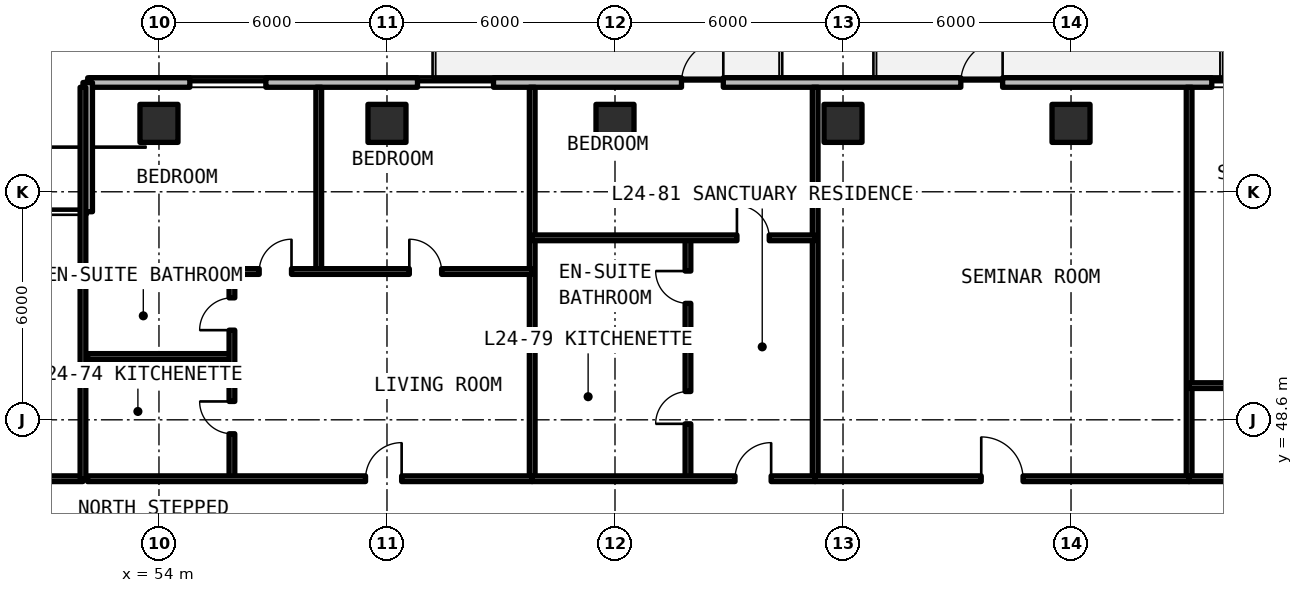
"""IFC4 building model, lengths in metres.
Left out: names, types, materials, properties, quantities, classifications, styles, units other than length and angle.
Written with IfcOpenShell. Run it as: python <this file> out.ifc"""

import sys

from ifc_helpers import new_model, si_unit, direction, frame, frame_2d, origin, origin_2d, place, context, subcontext, project, spatial, rectangle, extrude, element, fill, save


model = new_model("IFC4")
c1 = context("Model", 3, precision=1e-05, world=origin(), true_north=direction((0.0, 1.0)))
c2 = subcontext(c1, "Body", "Model", "MODEL_VIEW")
j1 = project(units=[si_unit("LENGTHUNIT", "METRE"), si_unit("PLANEANGLEUNIT", "RADIAN")], contexts=[c1])
p1 = place(None, origin())
s1 = spatial("IfcSite", under=j1, at=p1, CompositionType="ELEMENT")
p2 = place(p1, origin())
s2 = spatial("IfcBuilding", under=s1, at=p2, CompositionType="ELEMENT")
p3 = place(p2, frame((0.0, 0.0, 88.77)))
s3 = spatial("IfcBuildingStorey", under=s2, at=p3, CompositionType="ELEMENT", Elevation=88.77)
for number, where, z_axis, x_axis in (
    (1, (54.0, 56.4, 0.0), (0.0, 0.0, 1.0), (1.0, 0.0, 0.0)),
    (2, (60.0, 56.4, 0.0), (0.0, 0.0, 1.0), (1.0, 0.0, 0.0)),
    (3, (66.0, 56.4, 0.0), (0.0, 0.0, 1.0), (1.0, 0.0, 0.0)),
    (4, (72.0, 56.4, 0.0), (0.0, 0.0, 1.0), (1.0, 0.0, 0.0)),
    (5, (78.0, 56.4, 0.0), (0.0, 0.0, 1.0), (1.0, 0.0, 0.0)),
):
    element("IfcColumn", number, at=place(p3, frame(where, z_axis=z_axis, x_axis=x_axis)), inside=s3, PredefinedType="COLUMN", context=c2, shape_type="SweptSolid", body=[
        extrude(rectangle(XDim=1.0, YDim=1.0, at=origin_2d()), origin(), (0.0, 0.0, 1.0), 3.3),
    ])
p4 = place(p3, frame((96.148, 57.475, 0.0), z_axis=(0.0, 0.0, 1.0), x_axis=(-1.0, 0.0, 0.0)))
e6 = element("IfcWall", 6, at=p4, inside=s3, PredefinedType="SOLIDWALL", context=c2, shape_type="SweptSolid", body=[
    extrude(rectangle(XDim=44.023, YDim=0.25, at=frame_2d((22.012, 0.0))), origin(), (0.0, 0.0, 1.0), 3.08),
])
p5 = place(p4, frame((27.298, 0.0, 0.0)))
e7 = element("IfcOpeningElement", 7, at=p5, cuts=e6, PredefinedType="OPENING", context=c2, shape_type="SweptSolid", body=[
    extrude(rectangle(XDim=1.1, YDim=2.15, at=frame_2d((0.55, 1.075))), frame((0.0, 0.135, 0.0), z_axis=(0.0, -1.0, 0.0), x_axis=(1.0, 0.0, 0.0)), (0.0, 0.0, 1.0), 0.27),
])
p6 = place(p4, frame((19.948, 0.0, 0.0)))
e8 = element("IfcOpeningElement", 8, at=p6, cuts=e6, PredefinedType="OPENING", context=c2, shape_type="SweptSolid", body=[
    extrude(rectangle(XDim=1.1, YDim=2.15, at=frame_2d((0.55, 1.075))), frame((0.0, 0.135, 0.0), z_axis=(0.0, -1.0, 0.0), x_axis=(1.0, 0.0, 0.0)), (0.0, 0.0, 1.0), 0.27),
])
p7 = place(p4, frame((8.098, 0.0, 0.0)))
e9 = element("IfcOpeningElement", 9, at=p7, cuts=e6, PredefinedType="OPENING", context=c2, shape_type="SweptSolid", body=[
    extrude(rectangle(XDim=1.1, YDim=2.15, at=frame_2d((0.55, 1.075))), frame((0.0, 0.135, 0.0), z_axis=(0.0, -1.0, 0.0), x_axis=(1.0, 0.0, 0.0)), (0.0, 0.0, 1.0), 0.27),
])
p8 = place(p4, frame((39.336, 0.0, 0.78)))
e10 = element("IfcOpeningElement", 10, at=p8, cuts=e6, PredefinedType="OPENING", context=c2, shape_type="SweptSolid", body=[
    extrude(rectangle(XDim=2.0, YDim=1.66, at=frame_2d((1.0, 0.83))), frame((0.0, 0.135, 0.0), z_axis=(0.0, -1.0, 0.0), x_axis=(1.0, 0.0, 0.0)), (0.0, 0.0, 1.0), 0.27),
])
p9 = place(p4, frame((33.345, 0.0, 0.78)))
e11 = element("IfcOpeningElement", 11, at=p9, cuts=e6, PredefinedType="OPENING", context=c2, shape_type="SweptSolid", body=[
    extrude(rectangle(XDim=2.0, YDim=1.66, at=frame_2d((1.0, 0.83))), frame((0.0, 0.135, 0.0), z_axis=(0.0, -1.0, 0.0), x_axis=(1.0, 0.0, 0.0)), (0.0, 0.0, 1.0), 0.27),
])
p10 = place(p4, frame((13.044, 0.0, 0.78)))
e12 = element("IfcOpeningElement", 12, at=p10, cuts=e6, PredefinedType="OPENING", context=c2, shape_type="SweptSolid", body=[
    extrude(rectangle(XDim=1.4, YDim=1.65, at=frame_2d((0.7, 0.825))), frame((0.0, 0.135, 0.0), z_axis=(0.0, -1.0, 0.0), x_axis=(1.0, 0.0, 0.0)), (0.0, 0.0, 1.0), 0.27),
])
p11 = place(p4, frame((2.871, 0.0, 0.78)))
e13 = element("IfcOpeningElement", 13, at=p11, cuts=e6, PredefinedType="OPENING", context=c2, shape_type="SweptSolid", body=[
    extrude(rectangle(XDim=2.0, YDim=1.66, at=frame_2d((1.0, 0.83))), frame((0.0, 0.135, 0.0), z_axis=(0.0, -1.0, 0.0), x_axis=(1.0, 0.0, 0.0)), (0.0, 0.0, 1.0), 0.27),
])
p12 = place(p3, frame((52.125, 57.475, 0.0), z_axis=(0.0, 0.0, 1.0), x_axis=(0.0, -1.0, 0.0)))
e14 = element("IfcWall", 14, at=p12, inside=s3, PredefinedType="SOLIDWALL", context=c2, shape_type="SweptSolid", body=[
    extrude(rectangle(XDim=3.4, YDim=0.25, at=frame_2d((1.7, 0.0))), origin(), (0.0, 0.0, 1.0), 3.08),
])
p13 = place(p3, frame((43.6, 47.05, 0.0), z_axis=(0.0, 0.0, 1.0), x_axis=(1.0, 0.0, 0.0)))
e15 = element("IfcWall", 15, at=p13, inside=s3, PredefinedType="SOLIDWALL", context=c2, shape_type="SweptSolid", body=[
    extrude(rectangle(XDim=8.4, YDim=0.15, at=frame_2d((4.2, 0.0))), origin(), (0.0, 0.0, 1.0), 2.35),
])
p14 = place(p13, frame((3.65, 0.0, 0.0)))
e16 = element("IfcOpeningElement", 16, at=p14, cuts=e15, PredefinedType="OPENING", context=c2, shape_type="SweptSolid", body=[
    extrude(rectangle(XDim=1.1, YDim=2.15, at=frame_2d((0.55, 1.075))), frame((0.0, 0.085, 0.0), z_axis=(0.0, -1.0, 0.0), x_axis=(1.0, 0.0, 0.0)), (0.0, 0.0, 1.0), 0.17),
])
for number, where, z_axis, x_axis in (
    (17, (52.0, 47.05, 0.0), (0.0, 0.0, 1.0), (0.0, 1.0, 0.0)),
    (18, (63.821, 47.05, 0.0), (0.0, 0.0, 1.0), (0.0, 1.0, 0.0)),
):
    element("IfcWall", number, at=place(p3, frame(where, z_axis=z_axis, x_axis=x_axis)), inside=s3, PredefinedType="SOLIDWALL", context=c2, shape_type="SweptSolid", body=[
        extrude(rectangle(XDim=10.3, YDim=0.15, at=frame_2d((5.15, 0.0))), origin(), (0.0, 0.0, 1.0), 2.35),
    ])
p15 = place(p3, frame((52.12, 50.267, 0.0), z_axis=(0.0, 0.0, 1.0), x_axis=(1.0, 0.0, 0.0)))
e19 = element("IfcWall", 19, at=p15, inside=s3, PredefinedType="PARTITIONING", context=c2, shape_type="SweptSolid", body=[
    extrude(rectangle(XDim=3.8, YDim=0.15, at=frame_2d((1.9, 0.0))), origin(), (0.0, 0.0, 1.0), 2.35),
])
p16 = place(p3, frame((55.92, 47.05, 0.0), z_axis=(0.0, 0.0, 1.0), x_axis=(0.0, 1.0, 0.0)))
e20 = element("IfcWall", 20, at=p16, inside=s3, PredefinedType="PARTITIONING", context=c2, shape_type="SweptSolid", body=[
    extrude(rectangle(XDim=5.452, YDim=0.15, at=frame_2d((2.726, 0.0))), origin(), (0.0, 0.0, 1.0), 2.35),
])
p17 = place(p16, frame((1.183, 0.0, 0.0)))
e21 = element("IfcOpeningElement", 21, at=p17, cuts=e20, PredefinedType="OPENING", context=c2, shape_type="SweptSolid", body=[
    extrude(rectangle(XDim=0.85, YDim=2.1, at=frame_2d((0.425, 1.05))), frame((0.0, 0.085, 0.0), z_axis=(0.0, -1.0, 0.0), x_axis=(1.0, 0.0, 0.0)), (0.0, 0.0, 1.0), 0.17),
])
p18 = place(p16, frame((3.909, 0.0, 0.0)))
e22 = element("IfcOpeningElement", 22, at=p18, cuts=e20, PredefinedType="OPENING", context=c2, shape_type="SweptSolid", body=[
    extrude(rectangle(XDim=0.85, YDim=2.1, at=frame_2d((0.425, 1.05))), frame((0.0, 0.085, 0.0), z_axis=(0.0, -1.0, 0.0), x_axis=(1.0, 0.0, 0.0)), (0.0, 0.0, 1.0), 0.17),
])
p19 = place(p3, frame((58.205, 52.502, 0.0), z_axis=(0.0, 0.0, 1.0), x_axis=(0.0, 1.0, 0.0)))
e23 = element("IfcWall", 23, at=p19, inside=s3, PredefinedType="PARTITIONING", context=c2, shape_type="SweptSolid", body=[
    extrude(rectangle(XDim=4.848, YDim=0.15, at=frame_2d((2.424, 0.0))), origin(), (0.0, 0.0, 1.0), 2.35),
])
p20 = place(p3, frame((52.12, 52.502, 0.0), z_axis=(0.0, 0.0, 1.0), x_axis=(1.0, 0.0, 0.0)))
e24 = element("IfcWall", 24, at=p20, inside=s3, PredefinedType="PARTITIONING", context=c2, shape_type="SweptSolid", body=[
    extrude(rectangle(XDim=11.701, YDim=0.15, at=frame_2d((5.851, 0.0))), origin(), (0.0, 0.0, 1.0), 2.35),
])
p21 = place(p20, frame((4.517, 0.0, 0.0)))
e25 = element("IfcOpeningElement", 25, at=p21, cuts=e24, PredefinedType="OPENING", context=c2, shape_type="SweptSolid", body=[
    extrude(rectangle(XDim=0.85, YDim=2.1, at=frame_2d((0.425, 1.05))), frame((0.0, 0.085, 0.0), z_axis=(0.0, -1.0, 0.0), x_axis=(1.0, 0.0, 0.0)), (0.0, 0.0, 1.0), 0.17),
])
p22 = place(p20, frame((8.468, 0.0, 0.0)))
e26 = element("IfcOpeningElement", 26, at=p22, cuts=e24, PredefinedType="OPENING", context=c2, shape_type="SweptSolid", body=[
    extrude(rectangle(XDim=0.85, YDim=2.1, at=frame_2d((0.425, 1.05))), frame((0.0, 0.085, 0.0), z_axis=(0.0, -1.0, 0.0), x_axis=(1.0, 0.0, 0.0)), (0.0, 0.0, 1.0), 0.17),
])
p23 = place(p3, frame((52.12, 47.05, 0.0), z_axis=(0.0, 0.0, 1.0), x_axis=(1.0, 0.0, 0.0)))
e27 = element("IfcWall", 27, at=p23, inside=s3, PredefinedType="SOLIDWALL", context=c2, shape_type="SweptSolid", body=[
    extrude(rectangle(XDim=11.701, YDim=0.15, at=frame_2d((5.851, 0.0))), origin(), (0.0, 0.0, 1.0), 2.35),
])
p24 = place(p23, frame((7.316, 0.0, 0.0)))
e28 = element("IfcOpeningElement", 28, at=p24, cuts=e27, PredefinedType="OPENING", context=c2, shape_type="SweptSolid", body=[
    extrude(rectangle(XDim=0.95, YDim=2.15, at=frame_2d((0.475, 1.075))), frame((0.0, 0.085, 0.0), z_axis=(0.0, -1.0, 0.0), x_axis=(1.0, 0.0, 0.0)), (0.0, 0.0, 1.0), 0.17),
])
p25 = place(p3, frame((71.268, 47.05, 0.0), z_axis=(0.0, 0.0, 1.0), x_axis=(0.0, 1.0, 0.0)))
e29 = element("IfcWall", 29, at=p25, inside=s3, PredefinedType="SOLIDWALL", context=c2, shape_type="SweptSolid", body=[
    extrude(rectangle(XDim=10.3, YDim=0.15, at=frame_2d((5.15, 0.0))), origin(), (0.0, 0.0, 1.0), 2.35),
])
p26 = place(p3, frame((63.821, 50.79, 0.0), z_axis=(0.0, 0.0, 1.0), x_axis=(1.0, 0.0, 0.0)))
e30 = element("IfcWall", 30, at=p26, inside=s3, PredefinedType="PARTITIONING", context=c2, shape_type="SweptSolid", body=[
    extrude(rectangle(XDim=4.099, YDim=0.15, at=frame_2d((2.049, 0.0))), origin(), (0.0, 0.0, 1.0), 2.35),
])
p27 = place(p3, frame((67.92, 47.05, 0.0), z_axis=(0.0, 0.0, 1.0), x_axis=(0.0, 1.0, 0.0)))
e31 = element("IfcWall", 31, at=p27, inside=s3, PredefinedType="PARTITIONING", context=c2, shape_type="SweptSolid", body=[
    extrude(rectangle(XDim=6.338, YDim=0.15, at=frame_2d((3.169, 0.0))), origin(), (0.0, 0.0, 1.0), 2.35),
])
p28 = place(p27, frame((1.445, 0.0, 0.0)))
e32 = element("IfcOpeningElement", 32, at=p28, cuts=e31, PredefinedType="OPENING", context=c2, shape_type="SweptSolid", body=[
    extrude(rectangle(XDim=0.85, YDim=2.1, at=frame_2d((0.425, 1.05))), frame((0.0, 0.085, 0.0), z_axis=(0.0, -1.0, 0.0), x_axis=(1.0, 0.0, 0.0)), (0.0, 0.0, 1.0), 0.17),
])
p29 = place(p27, frame((4.614, 0.0, 0.0)))
e33 = element("IfcOpeningElement", 33, at=p29, cuts=e31, PredefinedType="OPENING", context=c2, shape_type="SweptSolid", body=[
    extrude(rectangle(XDim=0.85, YDim=2.1, at=frame_2d((0.425, 1.05))), frame((0.0, 0.085, 0.0), z_axis=(0.0, -1.0, 0.0), x_axis=(1.0, 0.0, 0.0)), (0.0, 0.0, 1.0), 0.17),
])
p30 = place(p3, frame((63.821, 53.388, 0.0), z_axis=(0.0, 0.0, 1.0), x_axis=(1.0, 0.0, 0.0)))
e34 = element("IfcWall", 34, at=p30, inside=s3, PredefinedType="PARTITIONING", context=c2, shape_type="SweptSolid", body=[
    extrude(rectangle(XDim=7.446, YDim=0.15, at=frame_2d((3.723, 0.0))), origin(), (0.0, 0.0, 1.0), 2.35),
])
p31 = place(p30, frame((5.387, 0.0, 0.0)))
e35 = element("IfcOpeningElement", 35, at=p31, cuts=e34, PredefinedType="OPENING", context=c2, shape_type="SweptSolid", body=[
    extrude(rectangle(XDim=0.85, YDim=2.1, at=frame_2d((0.425, 1.05))), frame((0.0, 0.085, 0.0), z_axis=(0.0, -1.0, 0.0), x_axis=(1.0, 0.0, 0.0)), (0.0, 0.0, 1.0), 0.17),
])
p32 = place(p3, frame((63.821, 47.05, 0.0), z_axis=(0.0, 0.0, 1.0), x_axis=(1.0, 0.0, 0.0)))
e36 = element("IfcWall", 36, at=p32, inside=s3, PredefinedType="SOLIDWALL", context=c2, shape_type="SweptSolid", body=[
    extrude(rectangle(XDim=7.446, YDim=0.15, at=frame_2d((3.723, 0.0))), origin(), (0.0, 0.0, 1.0), 2.35),
])
p33 = place(p32, frame((5.337, 0.0, 0.0)))
e37 = element("IfcOpeningElement", 37, at=p33, cuts=e36, PredefinedType="OPENING", context=c2, shape_type="SweptSolid", body=[
    extrude(rectangle(XDim=0.95, YDim=2.15, at=frame_2d((0.475, 1.075))), frame((0.0, 0.085, 0.0), z_axis=(0.0, -1.0, 0.0), x_axis=(1.0, 0.0, 0.0)), (0.0, 0.0, 1.0), 0.17),
])
p34 = place(p3, frame((81.107, 47.05, 0.0), z_axis=(0.0, 0.0, 1.0), x_axis=(0.0, 1.0, 0.0)))
e38 = element("IfcWall", 38, at=p34, inside=s3, PredefinedType="SOLIDWALL", context=c2, shape_type="SweptSolid", body=[
    extrude(rectangle(XDim=10.3, YDim=0.15, at=frame_2d((5.15, 0.0))), origin(), (0.0, 0.0, 1.0), 2.35),
])
p35 = place(p3, frame((71.268, 47.05, 0.0), z_axis=(0.0, 0.0, 1.0), x_axis=(1.0, 0.0, 0.0)))
e39 = element("IfcWall", 39, at=p35, inside=s3, PredefinedType="SOLIDWALL", context=c2, shape_type="SweptSolid", body=[
    extrude(rectangle(XDim=9.84, YDim=0.15, at=frame_2d((4.92, 0.0))), origin(), (0.0, 0.0, 1.0), 2.35),
])
p36 = place(p35, frame((4.37, 0.0, 0.0)))
e40 = element("IfcOpeningElement", 40, at=p36, cuts=e39, PredefinedType="OPENING", context=c2, shape_type="SweptSolid", body=[
    extrude(rectangle(XDim=1.1, YDim=2.15, at=frame_2d((0.55, 1.075))), frame((0.0, 0.085, 0.0), z_axis=(0.0, -1.0, 0.0), x_axis=(1.0, 0.0, 0.0)), (0.0, 0.0, 1.0), 0.17),
])
p37 = place(p3, frame((81.107, 49.5, 0.0), z_axis=(0.0, 0.0, 1.0), x_axis=(1.0, 0.0, 0.0)))
e41 = element("IfcWall", 41, at=p37, inside=s3, PredefinedType="PARTITIONING", context=c2, shape_type="SweptSolid", body=[
    extrude(rectangle(XDim=4.812, YDim=0.15, at=frame_2d((2.406, 0.0))), origin(), (0.0, 0.0, 1.0), 2.35),
])
p38 = place(p3, frame((81.107, 47.05, 0.0), z_axis=(0.0, 0.0, 1.0), x_axis=(1.0, 0.0, 0.0)))
e42 = element("IfcWall", 42, at=p38, inside=s3, PredefinedType="SOLIDWALL", context=c2, shape_type="SweptSolid", body=[
    extrude(rectangle(XDim=7.446, YDim=0.15, at=frame_2d((3.723, 0.0))), origin(), (0.0, 0.0, 1.0), 2.35),
])
p39 = place(p38, frame((5.694, 0.0, 0.0)))
e43 = element("IfcOpeningElement", 43, at=p39, cuts=e42, PredefinedType="OPENING", context=c2, shape_type="SweptSolid", body=[
    extrude(rectangle(XDim=0.95, YDim=2.15, at=frame_2d((0.475, 1.075))), frame((0.0, 0.085, 0.0), z_axis=(0.0, -1.0, 0.0), x_axis=(1.0, 0.0, 0.0)), (0.0, 0.0, 1.0), 0.17),
])
p40 = place(p5, frame((1.1, 0.0, 0.0), z_axis=(0.0, 0.0, 1.0), x_axis=(-1.0, 0.0, 0.0)))
e44 = element("IfcDoor", 44, at=p40, inside=s3, OperationType="SINGLE_SWING_LEFT", PredefinedType="DOOR", context=c2, shape_type="SweptSolid", body=[
    extrude(rectangle(XDim=1.1, YDim=2.15, at=frame_2d((0.55, 1.075))), frame((0.0, 0.025, 0.0), z_axis=(0.0, -1.0, 0.0), x_axis=(1.0, 0.0, 0.0)), (0.0, 0.0, 1.0), 0.05),
])
fill(e7, e44)
p41 = place(p6, frame((1.1, 0.0, 0.0), z_axis=(0.0, 0.0, 1.0), x_axis=(-1.0, 0.0, 0.0)))
e45 = element("IfcDoor", 45, at=p41, inside=s3, OperationType="SINGLE_SWING_RIGHT", PredefinedType="DOOR", context=c2, shape_type="SweptSolid", body=[
    extrude(rectangle(XDim=1.1, YDim=2.15, at=frame_2d((0.55, 1.075))), frame((0.0, 0.025, 0.0), z_axis=(0.0, -1.0, 0.0), x_axis=(1.0, 0.0, 0.0)), (0.0, 0.0, 1.0), 0.05),
])
fill(e8, e45)
p42 = place(p8, origin())
e46 = element("IfcWindow", 46, at=p42, inside=s3, PartitioningType="SINGLE_PANEL", PredefinedType="WINDOW", context=c2, shape_type="SweptSolid", body=[
    extrude(rectangle(XDim=2.0, YDim=1.66, at=frame_2d((1.0, 0.83))), frame((0.0, 0.03, 0.0), z_axis=(0.0, -1.0, 0.0), x_axis=(1.0, 0.0, 0.0)), (0.0, 0.0, 1.0), 0.06),
])
fill(e10, e46)
p43 = place(p9, origin())
e47 = element("IfcWindow", 47, at=p43, inside=s3, PartitioningType="SINGLE_PANEL", PredefinedType="WINDOW", context=c2, shape_type="SweptSolid", body=[
    extrude(rectangle(XDim=2.0, YDim=1.66, at=frame_2d((1.0, 0.83))), frame((0.0, 0.03, 0.0), z_axis=(0.0, -1.0, 0.0), x_axis=(1.0, 0.0, 0.0)), (0.0, 0.0, 1.0), 0.06),
])
fill(e11, e47)
p44 = place(p10, origin())
e48 = element("IfcWindow", 48, at=p44, inside=s3, PartitioningType="SINGLE_PANEL", PredefinedType="WINDOW", context=c2, shape_type="SweptSolid", body=[
    extrude(rectangle(XDim=1.4, YDim=1.65, at=frame_2d((0.7, 0.825))), frame((0.0, 0.03, 0.0), z_axis=(0.0, -1.0, 0.0), x_axis=(1.0, 0.0, 0.0)), (0.0, 0.0, 1.0), 0.06),
])
fill(e12, e48)
p45 = place(p17, origin())
e49 = element("IfcDoor", 49, at=p45, inside=s3, OperationType="SINGLE_SWING_RIGHT", PredefinedType="DOOR", context=c2, shape_type="SweptSolid", body=[
    extrude(rectangle(XDim=0.85, YDim=2.1, at=frame_2d((0.425, 1.05))), frame((0.0, 0.025, 0.0), z_axis=(0.0, -1.0, 0.0), x_axis=(1.0, 0.0, 0.0)), (0.0, 0.0, 1.0), 0.05),
])
fill(e21, e49)
p46 = place(p18, origin())
e50 = element("IfcDoor", 50, at=p46, inside=s3, OperationType="SINGLE_SWING_LEFT", PredefinedType="DOOR", context=c2, shape_type="SweptSolid", body=[
    extrude(rectangle(XDim=0.85, YDim=2.1, at=frame_2d((0.425, 1.05))), frame((0.0, 0.025, 0.0), z_axis=(0.0, -1.0, 0.0), x_axis=(1.0, 0.0, 0.0)), (0.0, 0.0, 1.0), 0.05),
])
fill(e22, e50)
p47 = place(p21, origin())
e51 = element("IfcDoor", 51, at=p47, inside=s3, OperationType="SINGLE_SWING_RIGHT", PredefinedType="DOOR", context=c2, shape_type="SweptSolid", body=[
    extrude(rectangle(XDim=0.85, YDim=2.1, at=frame_2d((0.425, 1.05))), frame((0.0, 0.025, 0.0), z_axis=(0.0, -1.0, 0.0), x_axis=(1.0, 0.0, 0.0)), (0.0, 0.0, 1.0), 0.05),
])
fill(e25, e51)
p48 = place(p22, origin())
e52 = element("IfcDoor", 52, at=p48, inside=s3, OperationType="SINGLE_SWING_LEFT", PredefinedType="DOOR", context=c2, shape_type="SweptSolid", body=[
    extrude(rectangle(XDim=0.85, YDim=2.1, at=frame_2d((0.425, 1.05))), frame((0.0, 0.025, 0.0), z_axis=(0.0, -1.0, 0.0), x_axis=(1.0, 0.0, 0.0)), (0.0, 0.0, 1.0), 0.05),
])
fill(e26, e52)
p49 = place(p24, origin())
e53 = element("IfcDoor", 53, at=p49, inside=s3, OperationType="SINGLE_SWING_RIGHT", PredefinedType="DOOR", context=c2, shape_type="SweptSolid", body=[
    extrude(rectangle(XDim=0.95, YDim=2.15, at=frame_2d((0.475, 1.075))), frame((0.0, 0.025, 0.0), z_axis=(0.0, -1.0, 0.0), x_axis=(1.0, 0.0, 0.0)), (0.0, 0.0, 1.0), 0.05),
])
fill(e28, e53)
p50 = place(p28, origin())
e54 = element("IfcDoor", 54, at=p50, inside=s3, OperationType="SINGLE_SWING_LEFT", PredefinedType="DOOR", context=c2, shape_type="SweptSolid", body=[
    extrude(rectangle(XDim=0.85, YDim=2.1, at=frame_2d((0.425, 1.05))), frame((0.0, 0.025, 0.0), z_axis=(0.0, -1.0, 0.0), x_axis=(1.0, 0.0, 0.0)), (0.0, 0.0, 1.0), 0.05),
])
fill(e32, e54)
p51 = place(p29, origin())
e55 = element("IfcDoor", 55, at=p51, inside=s3, OperationType="SINGLE_SWING_RIGHT", PredefinedType="DOOR", context=c2, shape_type="SweptSolid", body=[
    extrude(rectangle(XDim=0.85, YDim=2.1, at=frame_2d((0.425, 1.05))), frame((0.0, 0.025, 0.0), z_axis=(0.0, -1.0, 0.0), x_axis=(1.0, 0.0, 0.0)), (0.0, 0.0, 1.0), 0.05),
])
fill(e33, e55)
p52 = place(p31, origin())
e56 = element("IfcDoor", 56, at=p52, inside=s3, OperationType="SINGLE_SWING_LEFT", PredefinedType="DOOR", context=c2, shape_type="SweptSolid", body=[
    extrude(rectangle(XDim=0.85, YDim=2.1, at=frame_2d((0.425, 1.05))), frame((0.0, 0.025, 0.0), z_axis=(0.0, -1.0, 0.0), x_axis=(1.0, 0.0, 0.0)), (0.0, 0.0, 1.0), 0.05),
])
fill(e35, e56)
p53 = place(p33, origin())
e57 = element("IfcDoor", 57, at=p53, inside=s3, OperationType="SINGLE_SWING_RIGHT", PredefinedType="DOOR", context=c2, shape_type="SweptSolid", body=[
    extrude(rectangle(XDim=0.95, YDim=2.15, at=frame_2d((0.475, 1.075))), frame((0.0, 0.025, 0.0), z_axis=(0.0, -1.0, 0.0), x_axis=(1.0, 0.0, 0.0)), (0.0, 0.0, 1.0), 0.05),
])
fill(e37, e57)
p54 = place(p36, origin())
e58 = element("IfcDoor", 58, at=p54, inside=s3, OperationType="SINGLE_SWING_LEFT", PredefinedType="DOOR", context=c2, shape_type="SweptSolid", body=[
    extrude(rectangle(XDim=1.1, YDim=2.15, at=frame_2d((0.55, 1.075))), frame((0.0, 0.025, 0.0), z_axis=(0.0, -1.0, 0.0), x_axis=(1.0, 0.0, 0.0)), (0.0, 0.0, 1.0), 0.05),
])
fill(e40, e58)
save(model, sys.argv[1])
